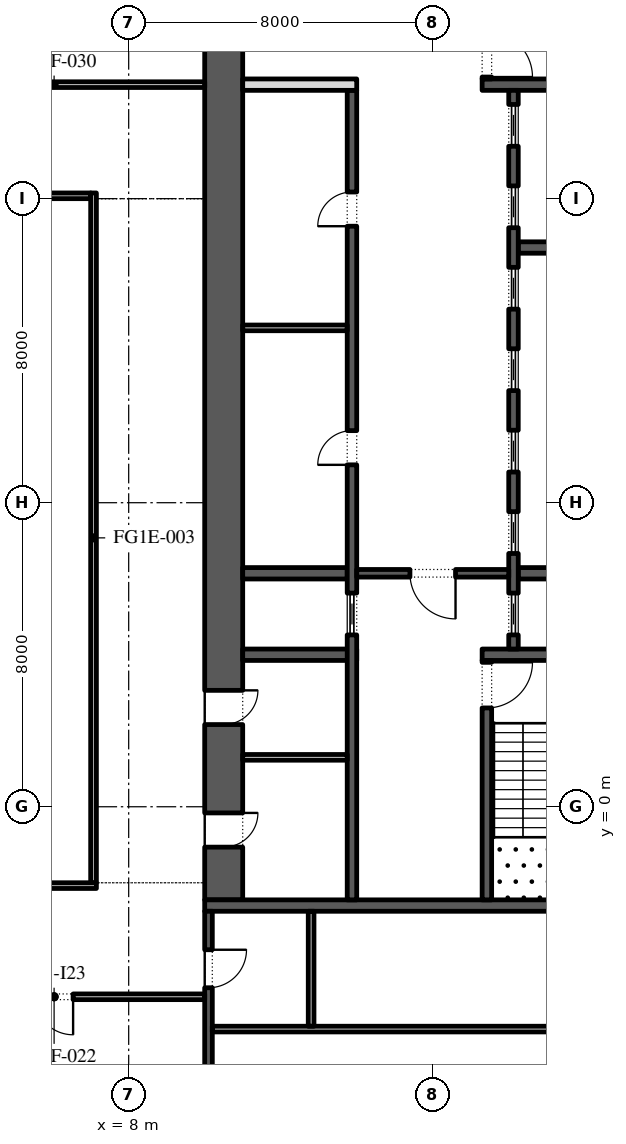
"""IFC4 building model, lengths in metres.
Left out: names, types, materials, properties, quantities, classifications, styles, units other than length and angle.
Written with IfcOpenShell. Run it as: python <this file> out.ifc"""

import sys

from ifc_helpers import new_model, si_unit, direction, frame, frame_2d, origin, place, context, subcontext, project, spatial, rectangle, extrude, element, fill, save


model = new_model("IFC4")
c1 = context("Model", 3, precision=1e-05, world=origin(), true_north=direction((0.0, 1.0)))
c2 = subcontext(c1, "Body", "Model", "MODEL_VIEW")
j1 = project(units=[si_unit("LENGTHUNIT", "METRE"), si_unit("PLANEANGLEUNIT", "RADIAN")], contexts=[c1])
p1 = place(None, origin())
s1 = spatial("IfcSite", under=j1, at=p1, CompositionType="ELEMENT")
p2 = place(p1, origin())
s2 = spatial("IfcBuilding", under=s1, at=p2, CompositionType="ELEMENT")
p3 = place(p2, frame((0.0, 0.0, 19.2)))
s3 = spatial("IfcBuildingStorey", under=s2, at=p3, CompositionType="ELEMENT", Elevation=19.2)
p4 = place(p3, frame((-7.15, 16.075, 0.0), z_axis=(0.0, 0.0, 1.0), x_axis=(1.0, 0.0, 0.0)))
e1 = element("IfcWall", 1, at=p4, inside=s3, PredefinedType="STANDARD", context=c2, shape_type="SweptSolid", body=[
    extrude(rectangle(XDim=14.15, YDim=0.15, at=frame_2d((7.075, 0.0))), origin(), (0.0, 0.0, 1.0), 3.52),
])
p5 = place(p3, frame((7.075, 16.15, 0.0), z_axis=(0.0, 0.0, 1.0), x_axis=(0.0, -1.0, 0.0)))
e2 = element("IfcWall", 2, at=p5, inside=s3, PredefinedType="STANDARD", context=c2, shape_type="SweptSolid", body=[
    extrude(rectangle(XDim=18.15, YDim=0.15, at=frame_2d((9.075, 0.0))), origin(), (0.0, 0.0, 1.0), 4.5),
])
p6 = place(p3, frame((7.15, -2.075, 0.0), z_axis=(0.0, 0.0, 1.0), x_axis=(-1.0, 0.0, 0.0)))
e3 = element("IfcWall", 3, at=p6, inside=s3, PredefinedType="STANDARD", context=c2, shape_type="SweptSolid", body=[
    extrude(rectangle(XDim=14.15, YDim=0.15, at=frame_2d((7.075, 0.0))), origin(), (0.0, 0.0, 1.0), 3.52),
])
p7 = place(p3, frame((10.5, -2.45, 0.0), z_axis=(0.0, 0.0, 1.0), x_axis=(0.0, 1.0, 0.0)))
e4 = element("IfcWall", 4, at=p7, inside=s3, PredefinedType="SHEAR", context=c2, shape_type="SweptSolid", body=[
    extrude(rectangle(XDim=27.9, YDim=1.0, at=frame_2d((13.95, 0.0))), origin(), (0.0, 0.0, 1.0), 4.5),
])
p8 = place(p7, frame((23.65, 0.0, 0.0)))
e5 = element("IfcOpeningElement", 5, at=p8, cuts=e4, PredefinedType="OPENING", context=c2, shape_type="SweptSolid", body=[
    extrude(rectangle(XDim=2.4, YDim=2.1, at=frame_2d((1.2, 1.05))), frame((0.0, 0.51, 0.0), z_axis=(0.0, -1.0, 0.0), x_axis=(1.0, 0.0, 0.0)), (0.0, 0.0, 1.0), 1.02),
])
p9 = place(p7, frame((1.387, 0.0, 0.0)))
e6 = element("IfcOpeningElement", 6, at=p9, cuts=e4, PredefinedType="OPENING", context=c2, shape_type="SweptSolid", body=[
    extrude(rectangle(XDim=0.9, YDim=2.1, at=frame_2d((0.45, 1.05))), frame((0.0, 0.51, 0.0), z_axis=(0.0, -1.0, 0.0), x_axis=(1.0, 0.0, 0.0)), (0.0, 0.0, 1.0), 1.02),
])
p10 = place(p7, frame((4.613, 0.0, 0.0)))
e7 = element("IfcOpeningElement", 7, at=p10, cuts=e4, PredefinedType="OPENING", context=c2, shape_type="SweptSolid", body=[
    extrude(rectangle(XDim=0.9, YDim=2.1, at=frame_2d((0.45, 1.05))), frame((0.0, 0.51, 0.0), z_axis=(0.0, -1.0, 0.0), x_axis=(1.0, 0.0, 0.0)), (0.0, 0.0, 1.0), 1.02),
])
p11 = place(p3, frame((10.0, -2.6, 0.0), z_axis=(0.0, 0.0, 1.0), x_axis=(1.0, 0.0, 0.0)))
e8 = element("IfcWall", 8, at=p11, inside=s3, PredefinedType="SHEAR", context=c2, shape_type="SweptSolid", body=[
    extrude(rectangle(XDim=12.0, YDim=0.3, at=frame_2d((6.0, 0.0))), origin(), (0.0, 0.0, 1.0), 4.5),
])
p12 = place(p3, frame((17.3, 4.0, 0.0), z_axis=(0.0, 0.0, 1.0), x_axis=(1.0, 0.0, 0.0)))
e9 = element("IfcWall", 9, at=p12, inside=s3, PredefinedType="SHEAR", context=c2, shape_type="SweptSolid", body=[
    extrude(rectangle(XDim=3.7, YDim=0.3, at=frame_2d((1.85, 0.0))), origin(), (0.0, 0.0, 1.0), 4.5),
])
p13 = place(p3, frame((17.425, -2.45, 0.0), z_axis=(0.0, 0.0, 1.0), x_axis=(0.0, 1.0, 0.0)))
e10 = element("IfcWall", 10, at=p13, inside=s3, PredefinedType="SHEAR", context=c2, shape_type="SweptSolid", body=[
    extrude(rectangle(XDim=6.3, YDim=0.25, at=frame_2d((3.15, 0.0))), origin(), (0.0, 0.0, 1.0), 4.5),
])
p14 = place(p13, frame((5.05, 0.0, 0.0)))
e11 = element("IfcOpeningElement", 11, at=p14, cuts=e10, PredefinedType="OPENING", context=c2, shape_type="SweptSolid", body=[
    extrude(rectangle(XDim=1.2, YDim=2.1, at=frame_2d((0.6, 1.05))), frame((0.0, 0.135, 0.0), z_axis=(0.0, -1.0, 0.0), x_axis=(1.0, 0.0, 0.0)), (0.0, 0.0, 1.0), 0.27),
])
p15 = place(p3, frame((17.3, 19.0, 0.0), z_axis=(0.0, 0.0, 1.0), x_axis=(1.0, 0.0, 0.0)))
e12 = element("IfcWall", 12, at=p15, inside=s3, PredefinedType="SHEAR", context=c2, shape_type="SweptSolid", body=[
    extrude(rectangle(XDim=3.7, YDim=0.3, at=frame_2d((1.85, 0.0))), origin(), (0.0, 0.0, 1.0), 4.5),
])
p16 = place(p3, frame((17.425, 19.15, 0.0), z_axis=(0.0, 0.0, 1.0), x_axis=(0.0, 1.0, 0.0)))
e13 = element("IfcWall", 13, at=p16, inside=s3, PredefinedType="SHEAR", context=c2, shape_type="SweptSolid", body=[
    extrude(rectangle(XDim=6.3, YDim=0.25, at=frame_2d((3.15, 0.0))), origin(), (0.0, 0.0, 1.0), 4.5),
])
p17 = place(p16, frame((0.05, 0.0, 0.0)))
e14 = element("IfcOpeningElement", 14, at=p17, cuts=e13, PredefinedType="OPENING", context=c2, shape_type="SweptSolid", body=[
    extrude(rectangle(XDim=1.2, YDim=2.1, at=frame_2d((0.6, 1.05))), frame((0.0, 0.135, 0.0), z_axis=(0.0, -1.0, 0.0), x_axis=(1.0, 0.0, 0.0)), (0.0, 0.0, 1.0), 0.27),
])
for number, where, z_axis, x_axis in (
    (15, (18.25, 6.143, 0.0), (0.0, 0.0, 1.0), (1.0, 0.0, 0.0)),
    (16, (18.25, 14.714, 0.0), (0.0, 0.0, 1.0), (1.0, 0.0, 0.0)),
):
    element("IfcWall", number, at=place(p3, frame(where, z_axis=z_axis, x_axis=x_axis)), inside=s3, PredefinedType="SHEAR", context=c2, shape_type="SweptSolid", body=[
        extrude(rectangle(XDim=2.75, YDim=0.3, at=frame_2d((1.375, 0.0))), origin(), (0.0, 0.0, 1.0), 4.5),
    ])
p18 = place(p3, frame((18.125, 4.15, 0.0), z_axis=(0.0, 0.0, 1.0), x_axis=(0.0, 1.0, 0.0)))
e17 = element("IfcWall", 17, at=p18, inside=s3, PredefinedType="SHEAR", context=c2, shape_type="SweptSolid", body=[
    extrude(rectangle(XDim=14.7, YDim=0.25, at=frame_2d((7.35, 0.0))), origin(), (0.0, 0.0, 1.0), 4.5),
])
p19 = place(p18, frame((0.371, 0.0, 0.0)))
e18 = element("IfcOpeningElement", 18, at=p19, cuts=e17, PredefinedType="OPENING", context=c2, shape_type="SweptSolid", body=[
    extrude(rectangle(XDim=1.1, YDim=2.1, at=frame_2d((0.55, 1.05))), frame((0.0, 0.135, 0.0), z_axis=(0.0, -1.0, 0.0), x_axis=(1.0, 0.0, 0.0)), (0.0, 0.0, 1.0), 0.27),
])
p20 = place(p18, frame((2.514, 0.0, 0.0)))
e19 = element("IfcOpeningElement", 19, at=p20, cuts=e17, PredefinedType="OPENING", context=c2, shape_type="SweptSolid", body=[
    extrude(rectangle(XDim=1.1, YDim=2.1, at=frame_2d((0.55, 1.05))), frame((0.0, 0.135, 0.0), z_axis=(0.0, -1.0, 0.0), x_axis=(1.0, 0.0, 0.0)), (0.0, 0.0, 1.0), 0.27),
])
p21 = place(p18, frame((4.657, 0.0, 0.0)))
e20 = element("IfcOpeningElement", 20, at=p21, cuts=e17, PredefinedType="OPENING", context=c2, shape_type="SweptSolid", body=[
    extrude(rectangle(XDim=1.1, YDim=2.1, at=frame_2d((0.55, 1.05))), frame((0.0, 0.135, 0.0), z_axis=(0.0, -1.0, 0.0), x_axis=(1.0, 0.0, 0.0)), (0.0, 0.0, 1.0), 0.27),
])
p22 = place(p18, frame((6.8, 0.0, 0.0)))
e21 = element("IfcOpeningElement", 21, at=p22, cuts=e17, PredefinedType="OPENING", context=c2, shape_type="SweptSolid", body=[
    extrude(rectangle(XDim=1.1, YDim=2.1, at=frame_2d((0.55, 1.05))), frame((0.0, 0.135, 0.0), z_axis=(0.0, -1.0, 0.0), x_axis=(1.0, 0.0, 0.0)), (0.0, 0.0, 1.0), 0.27),
])
p23 = place(p18, frame((8.943, 0.0, 0.0)))
e22 = element("IfcOpeningElement", 22, at=p23, cuts=e17, PredefinedType="OPENING", context=c2, shape_type="SweptSolid", body=[
    extrude(rectangle(XDim=1.1, YDim=2.1, at=frame_2d((0.55, 1.05))), frame((0.0, 0.135, 0.0), z_axis=(0.0, -1.0, 0.0), x_axis=(1.0, 0.0, 0.0)), (0.0, 0.0, 1.0), 0.27),
])
p24 = place(p18, frame((11.086, 0.0, 0.0)))
e23 = element("IfcOpeningElement", 23, at=p24, cuts=e17, PredefinedType="OPENING", context=c2, shape_type="SweptSolid", body=[
    extrude(rectangle(XDim=1.1, YDim=2.1, at=frame_2d((0.55, 1.05))), frame((0.0, 0.135, 0.0), z_axis=(0.0, -1.0, 0.0), x_axis=(1.0, 0.0, 0.0)), (0.0, 0.0, 1.0), 0.27),
])
p25 = place(p18, frame((13.229, 0.0, 0.0)))
e24 = element("IfcOpeningElement", 24, at=p25, cuts=e17, PredefinedType="OPENING", context=c2, shape_type="SweptSolid", body=[
    extrude(rectangle(XDim=1.1, YDim=2.1, at=frame_2d((0.55, 1.05))), frame((0.0, 0.135, 0.0), z_axis=(0.0, -1.0, 0.0), x_axis=(1.0, 0.0, 0.0)), (0.0, 0.0, 1.0), 0.27),
])
p26 = place(p3, frame((11.0, 4.0, 0.0), z_axis=(0.0, 0.0, 1.0), x_axis=(1.0, 0.0, 0.0)))
e25 = element("IfcWall", 25, at=p26, inside=s3, PredefinedType="SHEAR", context=c2, shape_type="SweptSolid", body=[
    extrude(rectangle(XDim=3.0, YDim=0.3, at=frame_2d((1.5, 0.0))), origin(), (0.0, 0.0, 1.0), 4.5),
])
p27 = place(p3, frame((11.0, 6.143, 0.0), z_axis=(0.0, 0.0, 1.0), x_axis=(1.0, 0.0, 0.0)))
e26 = element("IfcWall", 26, at=p27, inside=s3, PredefinedType="SHEAR", context=c2, shape_type="SweptSolid", body=[
    extrude(rectangle(XDim=2.75, YDim=0.3, at=frame_2d((1.375, 0.0))), origin(), (0.0, 0.0, 1.0), 4.5),
])
p28 = place(p3, frame((13.875, -2.45, 0.0), z_axis=(0.0, 0.0, 1.0), x_axis=(0.0, 1.0, 0.0)))
e27 = element("IfcWall", 27, at=p28, inside=s3, PredefinedType="SHEAR", context=c2, shape_type="SweptSolid", body=[
    extrude(rectangle(XDim=21.3, YDim=0.25, at=frame_2d((10.65, 0.0))), origin(), (0.0, 0.0, 1.0), 4.5),
])
p29 = place(p28, frame((11.446, 0.0, 0.0)))
e28 = element("IfcOpeningElement", 28, at=p29, cuts=e27, PredefinedType="OPENING", context=c2, shape_type="SweptSolid", body=[
    extrude(rectangle(XDim=0.9, YDim=2.1, at=frame_2d((0.45, 1.05))), frame((0.0, 0.135, 0.0), z_axis=(0.0, -1.0, 0.0), x_axis=(1.0, 0.0, 0.0)), (0.0, 0.0, 1.0), 0.27),
])
p30 = place(p28, frame((17.725, 0.0, 0.0)))
e29 = element("IfcOpeningElement", 29, at=p30, cuts=e27, PredefinedType="OPENING", context=c2, shape_type="SweptSolid", body=[
    extrude(rectangle(XDim=0.9, YDim=2.1, at=frame_2d((0.45, 1.05))), frame((0.0, 0.135, 0.0), z_axis=(0.0, -1.0, 0.0), x_axis=(1.0, 0.0, 0.0)), (0.0, 0.0, 1.0), 0.27),
])
p31 = place(p28, frame((6.971, 0.0, 0.0)))
e30 = element("IfcOpeningElement", 30, at=p31, cuts=e27, PredefinedType="OPENING", context=c2, shape_type="SweptSolid", body=[
    extrude(rectangle(XDim=1.1, YDim=2.1, at=frame_2d((0.55, 1.05))), frame((0.0, 0.135, 0.0), z_axis=(0.0, -1.0, 0.0), x_axis=(1.0, 0.0, 0.0)), (0.0, 0.0, 1.0), 0.27),
])
p32 = place(p3, frame((11.0, 19.0, 0.0), z_axis=(0.0, 0.0, 1.0), x_axis=(1.0, 0.0, 0.0)))
e31 = element("IfcWall", 31, at=p32, inside=s3, PredefinedType="PARTITIONING", context=c2, shape_type="SweptSolid", body=[
    extrude(rectangle(XDim=3.0, YDim=0.3, at=frame_2d((1.5, 0.0))), origin(), (0.0, 0.0, 1.0), 4.5),
])
p33 = place(p3, frame((11.0, 12.6, 0.0), z_axis=(0.0, 0.0, 1.0), x_axis=(1.0, 0.0, 0.0)))
e32 = element("IfcWall", 32, at=p33, inside=s3, PredefinedType="PARTITIONING", context=c2, shape_type="SweptSolid", body=[
    extrude(rectangle(XDim=2.75, YDim=0.15, at=frame_2d((1.375, 0.0))), origin(), (0.0, 0.0, 1.0), 4.5),
])
p34 = place(p3, frame((14.0, 6.143, 0.0), z_axis=(0.0, 0.0, 1.0), x_axis=(1.0, 0.0, 0.0)))
e33 = element("IfcWall", 33, at=p34, inside=s3, PredefinedType="SHEAR", context=c2, shape_type="SweptSolid", body=[
    extrude(rectangle(XDim=4.0, YDim=0.2, at=frame_2d((2.0, 0.0))), origin(), (0.0, 0.0, 1.0), 4.5),
])
p35 = place(p34, frame((1.4, 0.0, 0.0)))
e34 = element("IfcOpeningElement", 34, at=p35, cuts=e33, PredefinedType="OPENING", context=c2, shape_type="SweptSolid", body=[
    extrude(rectangle(XDim=1.2, YDim=2.1, at=frame_2d((0.6, 1.05))), frame((0.0, 0.11, 0.0), z_axis=(0.0, -1.0, 0.0), x_axis=(1.0, 0.0, 0.0)), (0.0, 0.0, 1.0), 0.22),
])
p36 = place(p3, frame((11.0, 1.3, 0.0), z_axis=(0.0, 0.0, 1.0), x_axis=(1.0, 0.0, 0.0)))
e35 = element("IfcWall", 35, at=p36, inside=s3, PredefinedType="PARTITIONING", context=c2, shape_type="SweptSolid", body=[
    extrude(rectangle(XDim=2.75, YDim=0.15, at=frame_2d((1.375, 0.0))), origin(), (0.0, 0.0, 1.0), 4.5),
])
p37 = place(p3, frame((10.1, -15.8, 0.0), z_axis=(0.0, 0.0, 1.0), x_axis=(0.0, 1.0, 0.0)))
e36 = element("IfcWall", 36, at=p37, inside=s3, PredefinedType="SHEAR", context=c2, shape_type="SweptSolid", body=[
    extrude(rectangle(XDim=13.05, YDim=0.2, at=frame_2d((6.525, 0.0))), origin(), (0.0, 0.0, 1.0), 4.5),
])
p38 = place(p37, frame((4.488, 0.0, 0.0)))
e37 = element("IfcOpeningElement", 37, at=p38, cuts=e36, PredefinedType="OPENING", context=c2, shape_type="SweptSolid", body=[
    extrude(rectangle(XDim=0.9, YDim=2.1, at=frame_2d((0.45, 1.05))), frame((0.0, 0.11, 0.0), z_axis=(0.0, -1.0, 0.0), x_axis=(1.0, 0.0, 0.0)), (0.0, 0.0, 1.0), 0.22),
])
p39 = place(p37, frame((11.038, 0.0, 0.0)))
e38 = element("IfcOpeningElement", 38, at=p39, cuts=e36, PredefinedType="OPENING", context=c2, shape_type="SweptSolid", body=[
    extrude(rectangle(XDim=1.0, YDim=2.1, at=frame_2d((0.5, 1.05))), frame((0.0, 0.11, 0.0), z_axis=(0.0, -1.0, 0.0), x_axis=(1.0, 0.0, 0.0)), (0.0, 0.0, 1.0), 0.22),
])
p40 = place(p3, frame((10.2, -5.85, 0.0), z_axis=(0.0, 0.0, 1.0), x_axis=(1.0, 0.0, 0.0)))
e39 = element("IfcWall", 39, at=p40, inside=s3, PredefinedType="PARTITIONING", context=c2, shape_type="SweptSolid", body=[
    extrude(rectangle(XDim=11.6, YDim=0.15, at=frame_2d((5.8, 0.0))), origin(), (0.0, 0.0, 1.0), 4.5),
])
p41 = place(p3, frame((12.8, -5.775, 0.0), z_axis=(0.0, 0.0, 1.0), x_axis=(0.0, 1.0, 0.0)))
e40 = element("IfcWall", 40, at=p41, inside=s3, PredefinedType="PARTITIONING", context=c2, shape_type="SweptSolid", body=[
    extrude(rectangle(XDim=3.025, YDim=0.15, at=frame_2d((1.512, 0.0))), origin(), (0.0, 0.0, 1.0), 4.5),
])
p42 = place(p3, frame((2.075, -5.0, 0.0), z_axis=(0.0, 0.0, 1.0), x_axis=(1.0, 0.0, 0.0)))
e41 = element("IfcWall", 41, at=p42, inside=s3, PredefinedType="PARTITIONING", context=c2, shape_type="SweptSolid", body=[
    extrude(rectangle(XDim=7.925, YDim=0.15, at=frame_2d((3.962, 0.0))), origin(), (0.0, 0.0, 1.0), 4.5),
])
p43 = place(p42, frame((3.462, 0.0, 0.0)))
e42 = element("IfcOpeningElement", 42, at=p43, cuts=e41, PredefinedType="OPENING", context=c2, shape_type="SweptSolid", body=[
    extrude(rectangle(XDim=1.0, YDim=2.1, at=frame_2d((0.5, 1.05))), frame((0.0, 0.085, 0.0), z_axis=(0.0, -1.0, 0.0), x_axis=(1.0, 0.0, 0.0)), (0.0, 0.0, 1.0), 0.17),
])
p44 = place(p3, frame((2.075, 19.0, 0.0), z_axis=(0.0, 0.0, 1.0), x_axis=(1.0, 0.0, 0.0)))
e43 = element("IfcWall", 43, at=p44, inside=s3, PredefinedType="PARTITIONING", context=c2, shape_type="SweptSolid", body=[
    extrude(rectangle(XDim=7.925, YDim=0.15, at=frame_2d((3.962, 0.0))), origin(), (0.0, 0.0, 1.0), 4.5),
])
p45 = place(p19, origin())
e44 = element("IfcDoor", 44, at=p45, inside=s3, OperationType="SLIDING_TO_LEFT", PredefinedType="DOOR", context=c2, shape_type="SweptSolid", body=[
    extrude(rectangle(XDim=1.1, YDim=2.1, at=frame_2d((0.55, 1.05))), frame((0.0, 0.025, 0.0), z_axis=(0.0, -1.0, 0.0), x_axis=(1.0, 0.0, 0.0)), (0.0, 0.0, 1.0), 0.05),
])
fill(e18, e44)
p46 = place(p20, origin())
e45 = element("IfcDoor", 45, at=p46, inside=s3, OperationType="SLIDING_TO_LEFT", PredefinedType="DOOR", context=c2, shape_type="SweptSolid", body=[
    extrude(rectangle(XDim=1.1, YDim=2.1, at=frame_2d((0.55, 1.05))), frame((0.0, 0.025, 0.0), z_axis=(0.0, -1.0, 0.0), x_axis=(1.0, 0.0, 0.0)), (0.0, 0.0, 1.0), 0.05),
])
fill(e19, e45)
p47 = place(p21, origin())
e46 = element("IfcDoor", 46, at=p47, inside=s3, OperationType="SLIDING_TO_LEFT", PredefinedType="DOOR", context=c2, shape_type="SweptSolid", body=[
    extrude(rectangle(XDim=1.1, YDim=2.1, at=frame_2d((0.55, 1.05))), frame((0.0, 0.025, 0.0), z_axis=(0.0, -1.0, 0.0), x_axis=(1.0, 0.0, 0.0)), (0.0, 0.0, 1.0), 0.05),
])
fill(e20, e46)
p48 = place(p22, origin())
e47 = element("IfcDoor", 47, at=p48, inside=s3, OperationType="SLIDING_TO_LEFT", PredefinedType="DOOR", context=c2, shape_type="SweptSolid", body=[
    extrude(rectangle(XDim=1.1, YDim=2.1, at=frame_2d((0.55, 1.05))), frame((0.0, 0.025, 0.0), z_axis=(0.0, -1.0, 0.0), x_axis=(1.0, 0.0, 0.0)), (0.0, 0.0, 1.0), 0.05),
])
fill(e21, e47)
p49 = place(p23, origin())
e48 = element("IfcDoor", 48, at=p49, inside=s3, OperationType="SLIDING_TO_LEFT", PredefinedType="DOOR", context=c2, shape_type="SweptSolid", body=[
    extrude(rectangle(XDim=1.1, YDim=2.1, at=frame_2d((0.55, 1.05))), frame((0.0, 0.025, 0.0), z_axis=(0.0, -1.0, 0.0), x_axis=(1.0, 0.0, 0.0)), (0.0, 0.0, 1.0), 0.05),
])
fill(e22, e48)
p50 = place(p24, origin())
e49 = element("IfcDoor", 49, at=p50, inside=s3, OperationType="SLIDING_TO_LEFT", PredefinedType="DOOR", context=c2, shape_type="SweptSolid", body=[
    extrude(rectangle(XDim=1.1, YDim=2.1, at=frame_2d((0.55, 1.05))), frame((0.0, 0.025, 0.0), z_axis=(0.0, -1.0, 0.0), x_axis=(1.0, 0.0, 0.0)), (0.0, 0.0, 1.0), 0.05),
])
fill(e23, e49)
p51 = place(p25, origin())
e50 = element("IfcDoor", 50, at=p51, inside=s3, OperationType="SLIDING_TO_LEFT", PredefinedType="DOOR", context=c2, shape_type="SweptSolid", body=[
    extrude(rectangle(XDim=1.1, YDim=2.1, at=frame_2d((0.55, 1.05))), frame((0.0, 0.025, 0.0), z_axis=(0.0, -1.0, 0.0), x_axis=(1.0, 0.0, 0.0)), (0.0, 0.0, 1.0), 0.05),
])
fill(e24, e50)
p52 = place(p29, origin())
e51 = element("IfcDoor", 51, at=p52, inside=s3, OperationType="SINGLE_SWING_RIGHT", PredefinedType="DOOR", context=c2, shape_type="SweptSolid", body=[
    extrude(rectangle(XDim=0.9, YDim=2.1, at=frame_2d((0.45, 1.05))), frame((0.0, 0.125, 0.0), z_axis=(0.0, -1.0, 0.0), x_axis=(1.0, 0.0, 0.0)), (0.0, 0.0, 1.0), 0.05),
])
fill(e28, e51)
p53 = place(p30, origin())
e52 = element("IfcDoor", 52, at=p53, inside=s3, OperationType="SINGLE_SWING_RIGHT", PredefinedType="DOOR", context=c2, shape_type="SweptSolid", body=[
    extrude(rectangle(XDim=0.9, YDim=2.1, at=frame_2d((0.45, 1.05))), frame((0.0, 0.125, 0.0), z_axis=(0.0, -1.0, 0.0), x_axis=(1.0, 0.0, 0.0)), (0.0, 0.0, 1.0), 0.05),
])
fill(e29, e52)
p54 = place(p31, origin())
e53 = element("IfcDoor", 53, at=p54, inside=s3, OperationType="SLIDING_TO_LEFT", PredefinedType="DOOR", context=c2, shape_type="SweptSolid", body=[
    extrude(rectangle(XDim=1.1, YDim=2.1, at=frame_2d((0.55, 1.05))), frame((0.0, 0.025, 0.0), z_axis=(0.0, -1.0, 0.0), x_axis=(1.0, 0.0, 0.0)), (0.0, 0.0, 1.0), 0.05),
])
fill(e30, e53)
p55 = place(p35, frame((1.2, 0.0, 0.0), z_axis=(0.0, 0.0, 1.0), x_axis=(-1.0, 0.0, 0.0)))
e54 = element("IfcDoor", 54, at=p55, inside=s3, OperationType="SINGLE_SWING_RIGHT", PredefinedType="DOOR", context=c2, shape_type="SweptSolid", body=[
    extrude(rectangle(XDim=1.2, YDim=2.1, at=frame_2d((0.6, 1.05))), frame((0.0, 0.025, 0.0), z_axis=(0.0, -1.0, 0.0), x_axis=(1.0, 0.0, 0.0)), (0.0, 0.0, 1.0), 0.05),
])
fill(e34, e54)
p56 = place(p14, frame((1.2, 0.0, 0.0), z_axis=(0.0, 0.0, 1.0), x_axis=(-1.0, 0.0, 0.0)))
e55 = element("IfcDoor", 55, at=p56, inside=s3, OperationType="SINGLE_SWING_RIGHT", PredefinedType="DOOR", context=c2, shape_type="SweptSolid", body=[
    extrude(rectangle(XDim=1.2, YDim=2.1, at=frame_2d((0.6, 1.05))), frame((0.0, 0.025, 0.0), z_axis=(0.0, -1.0, 0.0), x_axis=(1.0, 0.0, 0.0)), (0.0, 0.0, 1.0), 0.05),
])
fill(e11, e55)
p57 = place(p17, frame((1.2, 0.0, 0.0), z_axis=(0.0, 0.0, 1.0), x_axis=(-1.0, 0.0, 0.0)))
e56 = element("IfcDoor", 56, at=p57, inside=s3, OperationType="SINGLE_SWING_LEFT", PredefinedType="DOOR", context=c2, shape_type="SweptSolid", body=[
    extrude(rectangle(XDim=1.2, YDim=2.1, at=frame_2d((0.6, 1.05))), frame((0.0, 0.025, 0.0), z_axis=(0.0, -1.0, 0.0), x_axis=(1.0, 0.0, 0.0)), (0.0, 0.0, 1.0), 0.05),
])
fill(e14, e56)
p58 = place(p9, frame((0.9, -0.95, 0.0), z_axis=(0.0, 0.0, 1.0), x_axis=(-1.0, 0.0, 0.0)))
e57 = element("IfcDoor", 57, at=p58, inside=s3, OperationType="SINGLE_SWING_RIGHT", PredefinedType="DOOR", context=c2, shape_type="SweptSolid", body=[
    extrude(rectangle(XDim=0.9, YDim=2.1, at=frame_2d((0.45, 1.05))), frame((0.0, -0.45, 0.0), z_axis=(0.0, -1.0, 0.0), x_axis=(1.0, 0.0, 0.0)), (0.0, 0.0, 1.0), 0.05),
])
fill(e6, e57)
p59 = place(p10, frame((0.9, -0.95, 0.0), z_axis=(0.0, 0.0, 1.0), x_axis=(-1.0, 0.0, 0.0)))
e58 = element("IfcDoor", 58, at=p59, inside=s3, OperationType="SINGLE_SWING_RIGHT", PredefinedType="DOOR", context=c2, shape_type="SweptSolid", body=[
    extrude(rectangle(XDim=0.9, YDim=2.1, at=frame_2d((0.45, 1.05))), frame((0.0, -0.45, 0.0), z_axis=(0.0, -1.0, 0.0), x_axis=(1.0, 0.0, 0.0)), (0.0, 0.0, 1.0), 0.05),
])
fill(e7, e58)
p60 = place(p39, frame((1.0, -0.15, 0.0), z_axis=(0.0, 0.0, 1.0), x_axis=(-1.0, 0.0, 0.0)))
e59 = element("IfcDoor", 59, at=p60, inside=s3, OperationType="SINGLE_SWING_RIGHT", PredefinedType="DOOR", context=c2, shape_type="SweptSolid", body=[
    extrude(rectangle(XDim=1.0, YDim=2.1, at=frame_2d((0.5, 1.05))), frame((0.0, -0.05, 0.0), z_axis=(0.0, -1.0, 0.0), x_axis=(1.0, 0.0, 0.0)), (0.0, 0.0, 1.0), 0.05),
])
fill(e38, e59)
p61 = place(p43, frame((1.0, 0.0, 0.0), z_axis=(0.0, 0.0, 1.0), x_axis=(-1.0, 0.0, 0.0)))
e60 = element("IfcDoor", 60, at=p61, inside=s3, OperationType="SINGLE_SWING_RIGHT", PredefinedType="DOOR", context=c2, shape_type="SweptSolid", body=[
    extrude(rectangle(XDim=1.0, YDim=2.1, at=frame_2d((0.5, 1.05))), frame((0.0, 0.025, 0.0), z_axis=(0.0, -1.0, 0.0), x_axis=(1.0, 0.0, 0.0)), (0.0, 0.0, 1.0), 0.05),
])
fill(e42, e60)
save(model, sys.argv[1])
